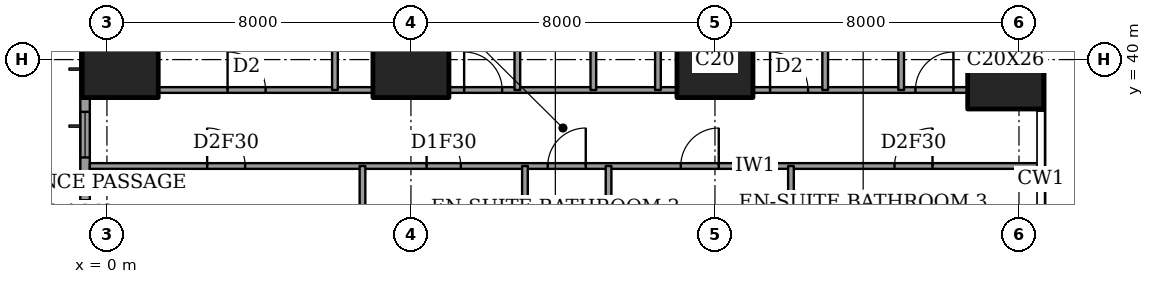
"""IFC4 building model, lengths in metres.
Left out: names, types, materials, properties, quantities, classifications, styles, units other than length and angle.
Written with IfcOpenShell. Run it as: python <this file> out.ifc"""

import sys

from ifc_helpers import new_model, si_unit, direction, frame, frame_2d, origin, origin_2d, place, context, subcontext, project, spatial, rectangle, extrude, element, fill, save


model = new_model("IFC4")
c1 = context("Model", 3, precision=1e-05, world=origin(), true_north=direction((0.0, 1.0)))
c2 = subcontext(c1, "Body", "Model", "MODEL_VIEW")
j1 = project(units=[si_unit("LENGTHUNIT", "METRE"), si_unit("PLANEANGLEUNIT", "RADIAN")], contexts=[c1])
p1 = place(None, origin())
s1 = spatial("IfcSite", under=j1, at=p1, CompositionType="ELEMENT")
p2 = place(p1, origin())
s2 = spatial("IfcBuilding", under=s1, at=p2, CompositionType="ELEMENT")
p3 = place(p2, frame((0.0, 0.0, 125.0)))
s3 = spatial("IfcBuildingStorey", under=s2, at=p3, CompositionType="ELEMENT", Elevation=125.0)
for number, where, z_axis, x_axis in (
    (1, (0.35, 40.0, 0.0), (0.0, 0.0, 1.0), (1.0, 0.0, 0.0)),
    (2, (8.0, 40.0, 0.0), (0.0, 0.0, 1.0), (1.0, 0.0, 0.0)),
    (3, (16.0, 40.0, 0.0), (0.0, 0.0, 1.0), (1.0, 0.0, 0.0)),
):
    element("IfcColumn", number, at=place(p3, frame(where, z_axis=z_axis, x_axis=x_axis)), inside=s3, PredefinedType="COLUMN", context=c2, shape_type="SweptSolid", body=[
        extrude(rectangle(XDim=2.0, YDim=2.0, at=origin_2d()), origin(), (0.0, 0.0, 1.0), 3.6),
    ])
p4 = place(p3, frame((23.65, 40.0, 0.0), z_axis=(0.0, 0.0, 1.0), x_axis=(1.0, 0.0, 0.0)))
e4 = element("IfcColumn", 4, at=p4, inside=s3, PredefinedType="COLUMN", context=c2, shape_type="SweptSolid", body=[
    extrude(rectangle(XDim=2.0, YDim=2.6, at=origin_2d()), origin(), (0.0, 0.0, 1.0), 3.6),
])
p5 = place(p3, frame((-0.575, 44.825, 0.0), z_axis=(0.0, 0.0, 1.0), x_axis=(0.0, -1.0, 0.0)))
e5 = element("IfcWall", 5, at=p5, inside=s3, PredefinedType="SOLIDWALL", context=c2, shape_type="SweptSolid", body=[
    extrude(rectangle(XDim=41.65, YDim=0.25, at=frame_2d((20.825, 0.0))), origin(), (0.0, 0.0, 1.0), 3.6),
])
p6 = place(p5, frame((0.775, 0.0, 0.4)))
e6 = element("IfcOpeningElement", 6, at=p6, cuts=e5, PredefinedType="OPENING", context=c2, shape_type="SweptSolid", body=[
    extrude(rectangle(XDim=2.4, YDim=2.2, at=frame_2d((1.2, 1.1))), frame((0.0, 0.135, 0.0), z_axis=(0.0, -1.0, 0.0), x_axis=(1.0, 0.0, 0.0)), (0.0, 0.0, 1.0), 0.27),
])
p7 = place(p5, frame((6.2, 0.0, 0.4)))
e7 = element("IfcOpeningElement", 7, at=p7, cuts=e5, PredefinedType="OPENING", context=c2, shape_type="SweptSolid", body=[
    extrude(rectangle(XDim=1.2, YDim=2.2, at=frame_2d((0.6, 1.1))), frame((0.0, 0.135, 0.0), z_axis=(0.0, -1.0, 0.0), x_axis=(1.0, 0.0, 0.0)), (0.0, 0.0, 1.0), 0.27),
])
p8 = place(p5, frame((8.525, 0.0, 0.4)))
e8 = element("IfcOpeningElement", 8, at=p8, cuts=e5, PredefinedType="OPENING", context=c2, shape_type="SweptSolid", body=[
    extrude(rectangle(XDim=2.4, YDim=2.2, at=frame_2d((1.2, 1.1))), frame((0.0, 0.135, 0.0), z_axis=(0.0, -1.0, 0.0), x_axis=(1.0, 0.0, 0.0)), (0.0, 0.0, 1.0), 0.27),
])
p9 = place(p5, frame((15.625, 0.0, 0.4)))
e9 = element("IfcOpeningElement", 9, at=p9, cuts=e5, PredefinedType="OPENING", context=c2, shape_type="SweptSolid", body=[
    extrude(rectangle(XDim=2.4, YDim=2.2, at=frame_2d((1.2, 1.1))), frame((0.0, 0.135, 0.0), z_axis=(0.0, -1.0, 0.0), x_axis=(1.0, 0.0, 0.0)), (0.0, 0.0, 1.0), 0.27),
])
p10 = place(p5, frame((23.625, 0.0, 0.4)))
e10 = element("IfcOpeningElement", 10, at=p10, cuts=e5, PredefinedType="OPENING", context=c2, shape_type="SweptSolid", body=[
    extrude(rectangle(XDim=2.4, YDim=2.2, at=frame_2d((1.2, 1.1))), frame((0.0, 0.135, 0.0), z_axis=(0.0, -1.0, 0.0), x_axis=(1.0, 0.0, 0.0)), (0.0, 0.0, 1.0), 0.27),
])
p11 = place(p5, frame((30.825, 0.0, 0.4)))
e11 = element("IfcOpeningElement", 11, at=p11, cuts=e5, PredefinedType="OPENING", context=c2, shape_type="SweptSolid", body=[
    extrude(rectangle(XDim=2.4, YDim=2.2, at=frame_2d((1.2, 1.1))), frame((0.0, 0.135, 0.0), z_axis=(0.0, -1.0, 0.0), x_axis=(1.0, 0.0, 0.0)), (0.0, 0.0, 1.0), 0.27),
])
p12 = place(p5, frame((34.5, 0.0, 0.4)))
e12 = element("IfcOpeningElement", 12, at=p12, cuts=e5, PredefinedType="OPENING", context=c2, shape_type="SweptSolid", body=[
    extrude(rectangle(XDim=1.2, YDim=2.2, at=frame_2d((0.6, 1.1))), frame((0.0, 0.135, 0.0), z_axis=(0.0, -1.0, 0.0), x_axis=(1.0, 0.0, 0.0)), (0.0, 0.0, 1.0), 0.27),
])
p13 = place(p5, frame((38.475, 0.0, 0.4)))
e13 = element("IfcOpeningElement", 13, at=p13, cuts=e5, PredefinedType="OPENING", context=c2, shape_type="SweptSolid", body=[
    extrude(rectangle(XDim=2.4, YDim=2.2, at=frame_2d((1.2, 1.1))), frame((0.0, 0.135, 0.0), z_axis=(0.0, -1.0, 0.0), x_axis=(1.0, 0.0, 0.0)), (0.0, 0.0, 1.0), 0.27),
])
p14 = place(p3, frame((-0.45, 37.2, 0.0), z_axis=(0.0, 0.0, 1.0), x_axis=(1.0, 0.0, 0.0)))
e14 = element("IfcWall", 14, at=p14, inside=s3, PredefinedType="PARTITIONING", context=c2, shape_type="SweptSolid", body=[
    extrude(rectangle(XDim=25.011, YDim=0.15, at=frame_2d((12.505, 0.0))), origin(), (0.0, 0.0, 1.0), 3.35),
])
p15 = place(p14, frame((12.05, 0.0, 0.0)))
e15 = element("IfcOpeningElement", 15, at=p15, cuts=e14, PredefinedType="OPENING", context=c2, shape_type="SweptSolid", body=[
    extrude(rectangle(XDim=1.0, YDim=2.1, at=frame_2d((0.5, 1.05))), frame((0.0, 0.085, 0.0), z_axis=(0.0, -1.0, 0.0), x_axis=(1.0, 0.0, 0.0)), (0.0, 0.0, 1.0), 0.17),
])
p16 = place(p14, frame((3.087, 0.0, 0.0)))
e16 = element("IfcOpeningElement", 16, at=p16, cuts=e14, PredefinedType="OPENING", context=c2, shape_type="SweptSolid", body=[
    extrude(rectangle(XDim=1.0, YDim=2.1, at=frame_2d((0.5, 1.05))), frame((0.0, 0.085, 0.0), z_axis=(0.0, -1.0, 0.0), x_axis=(1.0, 0.0, 0.0)), (0.0, 0.0, 1.0), 0.17),
])
p17 = place(p14, frame((8.863, 0.0, 0.0)))
e17 = element("IfcOpeningElement", 17, at=p17, cuts=e14, PredefinedType="OPENING", context=c2, shape_type="SweptSolid", body=[
    extrude(rectangle(XDim=0.9, YDim=2.1, at=frame_2d((0.45, 1.05))), frame((0.0, 0.085, 0.0), z_axis=(0.0, -1.0, 0.0), x_axis=(1.0, 0.0, 0.0)), (0.0, 0.0, 1.0), 0.17),
])
p18 = place(p14, frame((15.55, 0.0, 0.0)))
e18 = element("IfcOpeningElement", 18, at=p18, cuts=e14, PredefinedType="OPENING", context=c2, shape_type="SweptSolid", body=[
    extrude(rectangle(XDim=1.0, YDim=2.1, at=frame_2d((0.5, 1.05))), frame((0.0, 0.085, 0.0), z_axis=(0.0, -1.0, 0.0), x_axis=(1.0, 0.0, 0.0)), (0.0, 0.0, 1.0), 0.17),
])
p19 = place(p14, frame((21.175, 0.0, 0.0)))
e19 = element("IfcOpeningElement", 19, at=p19, cuts=e14, PredefinedType="OPENING", context=c2, shape_type="SweptSolid", body=[
    extrude(rectangle(XDim=1.0, YDim=2.1, at=frame_2d((0.5, 1.05))), frame((0.0, 0.085, 0.0), z_axis=(0.0, -1.0, 0.0), x_axis=(1.0, 0.0, 0.0)), (0.0, 0.0, 1.0), 0.17),
])
p20 = place(p3, frame((1.35, 39.2, 0.0), z_axis=(0.0, 0.0, 1.0), x_axis=(1.0, 0.0, 0.0)))
e20 = element("IfcWall", 20, at=p20, inside=s3, PredefinedType="PARTITIONING", context=c2, shape_type="SweptSolid", body=[
    extrude(rectangle(XDim=5.65, YDim=0.15, at=frame_2d((2.825, 0.0))), origin(), (0.0, 0.0, 1.0), 3.35),
])
p21 = place(p20, frame((1.825, 0.0, 0.0)))
e21 = element("IfcOpeningElement", 21, at=p21, cuts=e20, PredefinedType="OPENING", context=c2, shape_type="SweptSolid", body=[
    extrude(rectangle(XDim=1.0, YDim=2.1, at=frame_2d((0.5, 1.05))), frame((0.0, 0.085, 0.0), z_axis=(0.0, -1.0, 0.0), x_axis=(1.0, 0.0, 0.0)), (0.0, 0.0, 1.0), 0.17),
])
p22 = place(p3, frame((9.0, 39.2, 0.0), z_axis=(0.0, 0.0, 1.0), x_axis=(1.0, 0.0, 0.0)))
e22 = element("IfcWall", 22, at=p22, inside=s3, PredefinedType="PARTITIONING", context=c2, shape_type="SweptSolid", body=[
    extrude(rectangle(XDim=6.0, YDim=0.15, at=frame_2d((3.0, 0.0))), origin(), (0.0, 0.0, 1.0), 3.35),
])
p23 = place(p22, frame((0.4, 0.0, 0.0)))
e23 = element("IfcOpeningElement", 23, at=p23, cuts=e22, PredefinedType="OPENING", context=c2, shape_type="SweptSolid", body=[
    extrude(rectangle(XDim=1.0, YDim=2.1, at=frame_2d((0.5, 1.05))), frame((0.0, 0.085, 0.0), z_axis=(0.0, -1.0, 0.0), x_axis=(1.0, 0.0, 0.0)), (0.0, 0.0, 1.0), 0.17),
])
p24 = place(p3, frame((17.0, 39.2, 0.0), z_axis=(0.0, 0.0, 1.0), x_axis=(1.0, 0.0, 0.0)))
e24 = element("IfcWall", 24, at=p24, inside=s3, PredefinedType="PARTITIONING", context=c2, shape_type="SweptSolid", body=[
    extrude(rectangle(XDim=5.65, YDim=0.15, at=frame_2d((2.825, 0.0))), origin(), (0.0, 0.0, 1.0), 3.35),
])
p25 = place(p24, frame((0.45, 0.0, 0.0)))
e25 = element("IfcOpeningElement", 25, at=p25, cuts=e24, PredefinedType="OPENING", context=c2, shape_type="SweptSolid", body=[
    extrude(rectangle(XDim=1.0, YDim=2.1, at=frame_2d((0.5, 1.05))), frame((0.0, 0.085, 0.0), z_axis=(0.0, -1.0, 0.0), x_axis=(1.0, 0.0, 0.0)), (0.0, 0.0, 1.0), 0.17),
])
p26 = place(p24, frame((4.275, 0.0, 0.0)))
e26 = element("IfcOpeningElement", 26, at=p26, cuts=e24, PredefinedType="OPENING", context=c2, shape_type="SweptSolid", body=[
    extrude(rectangle(XDim=1.0, YDim=2.1, at=frame_2d((0.5, 1.05))), frame((0.0, 0.085, 0.0), z_axis=(0.0, -1.0, 0.0), x_axis=(1.0, 0.0, 0.0)), (0.0, 0.0, 1.0), 0.17),
])
p27 = place(p3, frame((6.0, 39.2, 0.0), z_axis=(0.0, 0.0, 1.0), x_axis=(0.0, 1.0, 0.0)))
e27 = element("IfcWall", 27, at=p27, inside=s3, PredefinedType="PARTITIONING", context=c2, shape_type="SweptSolid", body=[
    extrude(rectangle(XDim=9.25, YDim=0.15, at=frame_2d((4.625, 0.0))), origin(), (0.0, 0.0, 1.0), 3.35),
])
p28 = place(p3, frame((6.725, 33.2, 0.0), z_axis=(0.0, 0.0, 1.0), x_axis=(0.0, 1.0, 0.0)))
e28 = element("IfcWall", 28, at=p28, inside=s3, PredefinedType="PARTITIONING", context=c2, shape_type="SweptSolid", body=[
    extrude(rectangle(XDim=4.0, YDim=0.15, at=frame_2d((2.0, 0.0))), origin(), (0.0, 0.0, 1.0), 3.35),
])
p29 = place(p3, frame((10.8, 39.2, 0.0), z_axis=(0.0, 0.0, 1.0), x_axis=(0.0, 1.0, 0.0)))
e29 = element("IfcWall", 29, at=p29, inside=s3, PredefinedType="PARTITIONING", context=c2, shape_type="SweptSolid", body=[
    extrude(rectangle(XDim=3.4, YDim=0.15, at=frame_2d((1.7, 0.0))), origin(), (0.0, 0.0, 1.0), 3.35),
])
p30 = place(p29, frame((1.25, 0.0, 0.0)))
e30 = element("IfcOpeningElement", 30, at=p30, cuts=e29, PredefinedType="OPENING", context=c2, shape_type="SweptSolid", body=[
    extrude(rectangle(XDim=0.9, YDim=2.1, at=frame_2d((0.45, 1.05))), frame((0.0, 0.085, 0.0), z_axis=(0.0, -1.0, 0.0), x_axis=(1.0, 0.0, 0.0)), (0.0, 0.0, 1.0), 0.17),
])
p31 = place(p3, frame((11.0, 28.0, 0.0), z_axis=(0.0, 0.0, 1.0), x_axis=(0.0, 1.0, 0.0)))
e31 = element("IfcWall", 31, at=p31, inside=s3, PredefinedType="PARTITIONING", context=c2, shape_type="SweptSolid", body=[
    extrude(rectangle(XDim=9.2, YDim=0.15, at=frame_2d((4.6, 0.0))), origin(), (0.0, 0.0, 1.0), 3.35),
])
p32 = place(p31, frame((0.837, 0.0, 0.0)))
e32 = element("IfcOpeningElement", 32, at=p32, cuts=e31, PredefinedType="OPENING", context=c2, shape_type="SweptSolid", body=[
    extrude(rectangle(XDim=1.0, YDim=2.1, at=frame_2d((0.5, 1.05))), frame((0.0, 0.085, 0.0), z_axis=(0.0, -1.0, 0.0), x_axis=(1.0, 0.0, 0.0)), (0.0, 0.0, 1.0), 0.17),
])
p33 = place(p3, frame((12.8, 39.2, 0.0), z_axis=(0.0, 0.0, 1.0), x_axis=(0.0, 1.0, 0.0)))
e33 = element("IfcWall", 33, at=p33, inside=s3, PredefinedType="PARTITIONING", context=c2, shape_type="SweptSolid", body=[
    extrude(rectangle(XDim=9.25, YDim=0.15, at=frame_2d((4.625, 0.0))), origin(), (0.0, 0.0, 1.0), 3.35),
])
p34 = place(p33, frame((5.875, 0.0, 0.0)))
e34 = element("IfcOpeningElement", 34, at=p34, cuts=e33, PredefinedType="OPENING", context=c2, shape_type="SweptSolid", body=[
    extrude(rectangle(XDim=0.9, YDim=2.1, at=frame_2d((0.45, 1.05))), frame((0.0, 0.085, 0.0), z_axis=(0.0, -1.0, 0.0), x_axis=(1.0, 0.0, 0.0)), (0.0, 0.0, 1.0), 0.17),
])
p35 = place(p3, frame((13.2, 30.675, 0.0), z_axis=(0.0, 0.0, 1.0), x_axis=(0.0, 1.0, 0.0)))
e35 = element("IfcWall", 35, at=p35, inside=s3, PredefinedType="PARTITIONING", context=c2, shape_type="SweptSolid", body=[
    extrude(rectangle(XDim=6.525, YDim=0.15, at=frame_2d((3.262, 0.0))), origin(), (0.0, 0.0, 1.0), 3.35),
])
p36 = place(p3, frame((14.5, 39.2, 0.0), z_axis=(0.0, 0.0, 1.0), x_axis=(0.0, 1.0, 0.0)))
e36 = element("IfcWall", 36, at=p36, inside=s3, PredefinedType="PARTITIONING", context=c2, shape_type="SweptSolid", body=[
    extrude(rectangle(XDim=9.25, YDim=0.15, at=frame_2d((4.625, 0.0))), origin(), (0.0, 0.0, 1.0), 3.35),
])
p37 = place(p3, frame((18.0, 28.0, 0.0), z_axis=(0.0, 0.0, 1.0), x_axis=(0.0, 1.0, 0.0)))
e37 = element("IfcWall", 37, at=p37, inside=s3, PredefinedType="PARTITIONING", context=c2, shape_type="SweptSolid", body=[
    extrude(rectangle(XDim=9.2, YDim=0.15, at=frame_2d((4.6, 0.0))), origin(), (0.0, 0.0, 1.0), 3.35),
])
p38 = place(p37, frame((0.837, 0.0, 0.0)))
e38 = element("IfcOpeningElement", 38, at=p38, cuts=e37, PredefinedType="OPENING", context=c2, shape_type="SweptSolid", body=[
    extrude(rectangle(XDim=1.0, YDim=2.1, at=frame_2d((0.5, 1.05))), frame((0.0, 0.085, 0.0), z_axis=(0.0, -1.0, 0.0), x_axis=(1.0, 0.0, 0.0)), (0.0, 0.0, 1.0), 0.17),
])
p39 = place(p3, frame((18.9, 39.2, 0.0), z_axis=(0.0, 0.0, 1.0), x_axis=(0.0, 1.0, 0.0)))
e39 = element("IfcWall", 39, at=p39, inside=s3, PredefinedType="PARTITIONING", context=c2, shape_type="SweptSolid", body=[
    extrude(rectangle(XDim=3.7, YDim=0.15, at=frame_2d((1.85, 0.0))), origin(), (0.0, 0.0, 1.0), 3.35),
])
p40 = place(p39, frame((1.4, 0.0, 0.0)))
e40 = element("IfcOpeningElement", 40, at=p40, cuts=e39, PredefinedType="OPENING", context=c2, shape_type="SweptSolid", body=[
    extrude(rectangle(XDim=0.9, YDim=2.1, at=frame_2d((0.45, 1.05))), frame((0.0, 0.085, 0.0), z_axis=(0.0, -1.0, 0.0), x_axis=(1.0, 0.0, 0.0)), (0.0, 0.0, 1.0), 0.17),
])
p41 = place(p3, frame((20.9, 39.2, 0.0), z_axis=(0.0, 0.0, 1.0), x_axis=(0.0, 1.0, 0.0)))
e41 = element("IfcWall", 41, at=p41, inside=s3, PredefinedType="PARTITIONING", context=c2, shape_type="SweptSolid", body=[
    extrude(rectangle(XDim=9.25, YDim=0.15, at=frame_2d((4.625, 0.0))), origin(), (0.0, 0.0, 1.0), 3.35),
])
p42 = place(p7, origin())
e42 = element("IfcWindow", 42, at=p42, inside=s3, PartitioningType="SINGLE_PANEL", PredefinedType="WINDOW", context=c2, shape_type="SweptSolid", body=[
    extrude(rectangle(XDim=1.2, YDim=2.2, at=frame_2d((0.6, 1.1))), frame((0.0, 0.03, 0.0), z_axis=(0.0, -1.0, 0.0), x_axis=(1.0, 0.0, 0.0)), (0.0, 0.0, 1.0), 0.06),
])
fill(e7, e42)
p43 = place(p8, origin())
e43 = element("IfcWindow", 43, at=p43, inside=s3, PartitioningType="SINGLE_PANEL", PredefinedType="WINDOW", context=c2, shape_type="SweptSolid", body=[
    extrude(rectangle(XDim=2.4, YDim=2.2, at=frame_2d((1.2, 1.1))), frame((0.0, 0.03, 0.0), z_axis=(0.0, -1.0, 0.0), x_axis=(1.0, 0.0, 0.0)), (0.0, 0.0, 1.0), 0.06),
])
fill(e8, e43)
p44 = place(p21, origin())
e44 = element("IfcDoor", 44, at=p44, inside=s3, OperationType="SINGLE_SWING_RIGHT", PredefinedType="DOOR", context=c2, shape_type="SweptSolid", body=[
    extrude(rectangle(XDim=1.0, YDim=2.1, at=frame_2d((0.5, 1.05))), frame((0.0, 0.025, 0.0), z_axis=(0.0, -1.0, 0.0), x_axis=(1.0, 0.0, 0.0)), (0.0, 0.0, 1.0), 0.05),
])
fill(e21, e44)
p45 = place(p23, origin())
e45 = element("IfcDoor", 45, at=p45, inside=s3, OperationType="SINGLE_SWING_RIGHT", PredefinedType="DOOR", context=c2, shape_type="SweptSolid", body=[
    extrude(rectangle(XDim=1.0, YDim=2.1, at=frame_2d((0.5, 1.05))), frame((0.0, 0.025, 0.0), z_axis=(0.0, -1.0, 0.0), x_axis=(1.0, 0.0, 0.0)), (0.0, 0.0, 1.0), 0.05),
])
fill(e23, e45)
p46 = place(p25, origin())
e46 = element("IfcDoor", 46, at=p46, inside=s3, OperationType="SINGLE_SWING_RIGHT", PredefinedType="DOOR", context=c2, shape_type="SweptSolid", body=[
    extrude(rectangle(XDim=1.0, YDim=2.1, at=frame_2d((0.5, 1.05))), frame((0.0, 0.025, 0.0), z_axis=(0.0, -1.0, 0.0), x_axis=(1.0, 0.0, 0.0)), (0.0, 0.0, 1.0), 0.05),
])
fill(e25, e46)
p47 = place(p26, origin())
e47 = element("IfcDoor", 47, at=p47, inside=s3, OperationType="SINGLE_SWING_LEFT", PredefinedType="DOOR", context=c2, shape_type="SweptSolid", body=[
    extrude(rectangle(XDim=1.0, YDim=2.1, at=frame_2d((0.5, 1.05))), frame((0.0, 0.025, 0.0), z_axis=(0.0, -1.0, 0.0), x_axis=(1.0, 0.0, 0.0)), (0.0, 0.0, 1.0), 0.05),
])
fill(e26, e47)
p48 = place(p15, origin())
e48 = element("IfcDoor", 48, at=p48, inside=s3, OperationType="SINGLE_SWING_LEFT", PredefinedType="DOOR", context=c2, shape_type="SweptSolid", body=[
    extrude(rectangle(XDim=1.0, YDim=2.1, at=frame_2d((0.5, 1.05))), frame((0.0, 0.025, 0.0), z_axis=(0.0, -1.0, 0.0), x_axis=(1.0, 0.0, 0.0)), (0.0, 0.0, 1.0), 0.05),
])
fill(e15, e48)
p49 = place(p16, origin())
e49 = element("IfcDoor", 49, at=p49, inside=s3, OperationType="SINGLE_SWING_RIGHT", PredefinedType="DOOR", context=c2, shape_type="SweptSolid", body=[
    extrude(rectangle(XDim=1.0, YDim=2.1, at=frame_2d((0.5, 1.05))), frame((0.0, 0.025, 0.0), z_axis=(0.0, -1.0, 0.0), x_axis=(1.0, 0.0, 0.0)), (0.0, 0.0, 1.0), 0.05),
])
fill(e16, e49)
p50 = place(p17, origin())
e50 = element("IfcDoor", 50, at=p50, inside=s3, OperationType="SINGLE_SWING_RIGHT", PredefinedType="DOOR", context=c2, shape_type="SweptSolid", body=[
    extrude(rectangle(XDim=0.9, YDim=2.1, at=frame_2d((0.45, 1.05))), frame((0.0, 0.025, 0.0), z_axis=(0.0, -1.0, 0.0), x_axis=(1.0, 0.0, 0.0)), (0.0, 0.0, 1.0), 0.05),
])
fill(e17, e50)
p51 = place(p18, origin())
e51 = element("IfcDoor", 51, at=p51, inside=s3, OperationType="SINGLE_SWING_LEFT", PredefinedType="DOOR", context=c2, shape_type="SweptSolid", body=[
    extrude(rectangle(XDim=1.0, YDim=2.1, at=frame_2d((0.5, 1.05))), frame((0.0, 0.025, 0.0), z_axis=(0.0, -1.0, 0.0), x_axis=(1.0, 0.0, 0.0)), (0.0, 0.0, 1.0), 0.05),
])
fill(e18, e51)
p52 = place(p19, origin())
e52 = element("IfcDoor", 52, at=p52, inside=s3, OperationType="SINGLE_SWING_LEFT", PredefinedType="DOOR", context=c2, shape_type="SweptSolid", body=[
    extrude(rectangle(XDim=1.0, YDim=2.1, at=frame_2d((0.5, 1.05))), frame((0.0, 0.025, 0.0), z_axis=(0.0, -1.0, 0.0), x_axis=(1.0, 0.0, 0.0)), (0.0, 0.0, 1.0), 0.05),
])
fill(e19, e52)
save(model, sys.argv[1])
